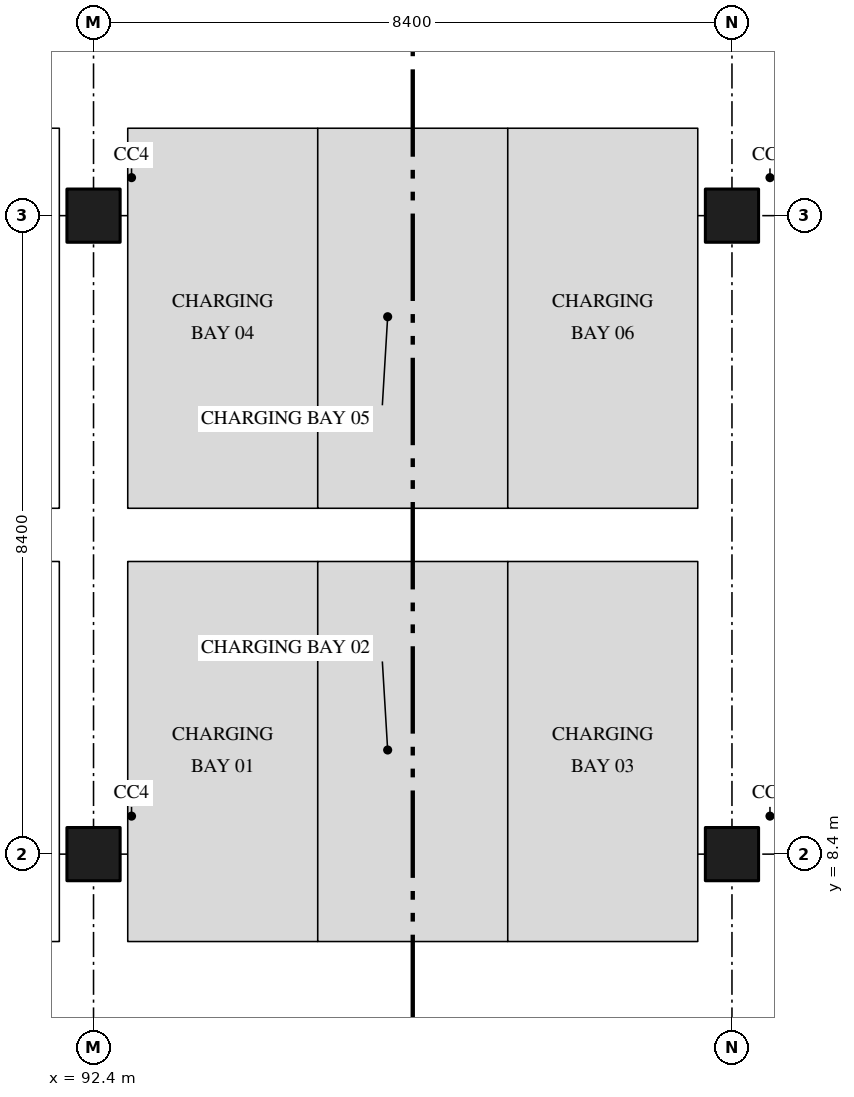
"""IFC4 building model, lengths in metres.
Left out: names, types, materials, properties, quantities, classifications, styles, units other than length and angle.
Written with IfcOpenShell. Run it as: python <this file> out.ifc"""

import sys

from ifc_helpers import new_model, si_unit, direction, frame, origin, origin_2d, place, context, subcontext, project, spatial, rectangle, extrude, element, save


model = new_model("IFC4")
c1 = context("Model", 3, precision=1e-05, world=origin(), true_north=direction((0.0, 1.0)))
c2 = subcontext(c1, "Body", "Model", "MODEL_VIEW")
j1 = project(units=[si_unit("LENGTHUNIT", "METRE"), si_unit("PLANEANGLEUNIT", "RADIAN")], contexts=[c1])
p1 = place(None, origin())
s1 = spatial("IfcSite", under=j1, at=p1, CompositionType="ELEMENT")
p2 = place(p1, origin())
s2 = spatial("IfcBuilding", under=s1, at=p2, CompositionType="ELEMENT")
p3 = place(p2, frame((0.0, 0.0, -4.5)))
s3 = spatial("IfcBuildingStorey", under=s2, at=p3, CompositionType="ELEMENT", Elevation=-4.5)
for number, where, z_axis, x_axis in (
    (1, (92.4, 8.4, 0.0), (0.0, 0.0, 1.0), (1.0, 0.0, 0.0)),
    (2, (92.4, 16.8, 0.0), (0.0, 0.0, 1.0), (1.0, 0.0, 0.0)),
    (3, (100.8, 8.4, 0.0), (0.0, 0.0, 1.0), (1.0, 0.0, 0.0)),
    (4, (100.8, 16.8, 0.0), (0.0, 0.0, 1.0), (1.0, 0.0, 0.0)),
):
    element("IfcColumn", number, at=place(p3, frame(where, z_axis=z_axis, x_axis=x_axis)), inside=s3, PredefinedType="COLUMN", context=c2, shape_type="SweptSolid", body=[
        extrude(rectangle(XDim=0.7, YDim=0.7, at=origin_2d()), origin(), (0.0, 0.0, 1.0), 4.05),
    ])
save(model, sys.argv[1])
